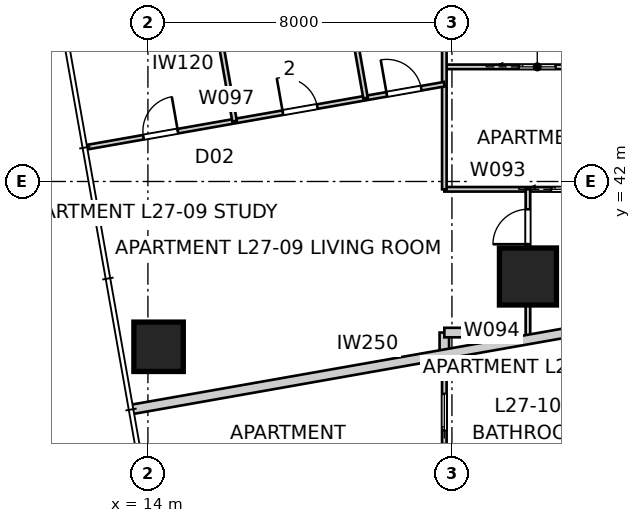
"""IFC4 building model, lengths in metres.
Left out: names, types, materials, properties, quantities, classifications, styles, units other than length and angle.
Written with IfcOpenShell. Run it as: python <this file> out.ifc"""

import sys

from ifc_helpers import new_model, si_unit, direction, frame, frame_2d, origin, origin_2d, place, context, subcontext, project, spatial, rectangle, extrude, element, fill, save


model = new_model("IFC4")
c1 = context("Model", 3, precision=1e-05, world=origin(), true_north=direction((0.0, 1.0)))
c2 = subcontext(c1, "Body", "Model", "MODEL_VIEW")
j1 = project(units=[si_unit("LENGTHUNIT", "METRE"), si_unit("PLANEANGLEUNIT", "RADIAN")], contexts=[c1])
p1 = place(None, origin())
s1 = spatial("IfcSite", under=j1, at=p1, CompositionType="ELEMENT")
p2 = place(p1, origin())
s2 = spatial("IfcBuilding", under=s1, at=p2, CompositionType="ELEMENT")
p3 = place(p2, frame((0.0, 0.0, 99.8)))
s3 = spatial("IfcBuildingStorey", under=s2, at=p3, CompositionType="ELEMENT", Elevation=99.8)
p4 = place(p3, frame((14.281, 37.65, 0.0), z_axis=(0.0, 0.0, 1.0), x_axis=(1.0, 0.0, 0.0)))
e1 = element("IfcColumn", 1, at=p4, inside=s3, PredefinedType="COLUMN", context=c2, shape_type="SweptSolid", body=[
    extrude(rectangle(XDim=1.3, YDim=1.3, at=origin_2d()), origin(), (0.0, 0.0, 1.0), 3.4),
])
p5 = place(p3, frame((24.0, 39.5, 0.0), z_axis=(0.0, 0.0, 1.0), x_axis=(1.0, 0.0, 0.0)))
e2 = element("IfcColumn", 2, at=p5, inside=s3, PredefinedType="COLUMN", context=c2, shape_type="SweptSolid", body=[
    extrude(rectangle(XDim=1.5, YDim=1.5, at=origin_2d()), origin(), (0.0, 0.0, 1.0), 3.4),
])
p6 = place(p3, frame((13.556, 35.999, 0.0), z_axis=(0.0, 0.0, 1.0), x_axis=(0.984809355703, 0.173639088111, 0.0)))
e3 = element("IfcWall", 3, at=p6, inside=s3, PredefinedType="PARTITIONING", context=c2, shape_type="SweptSolid", body=[
    extrude(rectangle(XDim=12.857, YDim=0.25, at=frame_2d((6.428, 0.0))), origin(), (0.0, 0.0, 1.0), 3.25),
])
p7 = place(p3, frame((21.8, 11.8, 0.0), z_axis=(0.0, 0.0, 1.0), x_axis=(0.0, 1.0, 0.0)))
e4 = element("IfcWall", 4, at=p7, inside=s3, PredefinedType="PARTITIONING", context=c2, shape_type="SweptSolid", body=[
    extrude(rectangle(XDim=25.653, YDim=0.12, at=frame_2d((12.826, 0.0))), origin(), (0.0, 0.0, 1.0), 3.25),
])
p8 = place(p7, frame((16.333, 0.0, 0.0)))
e5 = element("IfcOpeningElement", 5, at=p8, cuts=e4, PredefinedType="OPENING", context=c2, shape_type="SweptSolid", body=[
    extrude(rectangle(XDim=0.92, YDim=2.34, at=frame_2d((0.46, 1.17))), frame((0.0, 0.07, 0.0), z_axis=(0.0, -1.0, 0.0), x_axis=(1.0, 0.0, 0.0)), (0.0, 0.0, 1.0), 0.14),
])
p9 = place(p7, frame((18.821, 0.0, 0.0)))
e6 = element("IfcOpeningElement", 6, at=p9, cuts=e4, PredefinedType="OPENING", context=c2, shape_type="SweptSolid", body=[
    extrude(rectangle(XDim=0.92, YDim=2.34, at=frame_2d((0.46, 1.17))), frame((0.0, 0.07, 0.0), z_axis=(0.0, -1.0, 0.0), x_axis=(1.0, 0.0, 0.0)), (0.0, 0.0, 1.0), 0.14),
])
p10 = place(p7, frame((12.401, 0.0, 0.0)))
e7 = element("IfcOpeningElement", 7, at=p10, cuts=e4, PredefinedType="OPENING", context=c2, shape_type="SweptSolid", body=[
    extrude(rectangle(XDim=0.92, YDim=2.34, at=frame_2d((0.46, 1.17))), frame((0.0, 0.07, 0.0), z_axis=(0.0, -1.0, 0.0), x_axis=(1.0, 0.0, 0.0)), (0.0, 0.0, 1.0), 0.14),
])
p11 = place(p7, frame((2.066, 0.0, 0.0)))
e8 = element("IfcOpeningElement", 8, at=p11, cuts=e4, PredefinedType="OPENING", context=c2, shape_type="SweptSolid", body=[
    extrude(rectangle(XDim=0.92, YDim=2.34, at=frame_2d((0.46, 1.17))), frame((0.0, 0.07, 0.0), z_axis=(0.0, -1.0, 0.0), x_axis=(1.0, 0.0, 0.0)), (0.0, 0.0, 1.0), 0.14),
])
p12 = place(p7, frame((23.651, 0.0, 0.0)))
e9 = element("IfcOpeningElement", 9, at=p12, cuts=e4, PredefinedType="OPENING", context=c2, shape_type="SweptSolid", body=[
    extrude(rectangle(XDim=0.96, YDim=2.1, at=frame_2d((0.48, 1.05))), frame((0.0, 0.07, 0.0), z_axis=(0.0, -1.0, 0.0), x_axis=(1.0, 0.0, 0.0)), (0.0, 0.0, 1.0), 0.14),
])
p13 = place(p3, frame((21.8, 37.478, 0.0), z_axis=(0.0, 0.0, 1.0), x_axis=(0.0, 1.0, 0.0)))
e10 = element("IfcWall", 10, at=p13, inside=s3, PredefinedType="PARTITIONING", context=c2, shape_type="SweptSolid", body=[
    extrude(rectangle(XDim=0.547, YDim=0.25, at=frame_2d((0.273, 0.0))), origin(), (0.0, 0.0, 1.0), 3.25),
])
p14 = place(p3, frame((21.8, 38.025, 0.0), z_axis=(0.0, 0.0, 1.0), x_axis=(1.0, 0.0, 0.0)))
e11 = element("IfcWall", 11, at=p14, inside=s3, PredefinedType="PARTITIONING", context=c2, shape_type="SweptSolid", body=[
    extrude(rectangle(XDim=1.861, YDim=0.25, at=frame_2d((0.93, 0.0))), origin(), (0.0, 0.0, 1.0), 3.25),
])
p15 = place(p3, frame((21.8, 41.795, 0.0), z_axis=(0.0, 0.0, 1.0), x_axis=(1.0, 0.0, 0.0)))
e12 = element("IfcWall", 12, at=p15, inside=s3, PredefinedType="PARTITIONING", context=c2, shape_type="SweptSolid", body=[
    extrude(rectangle(XDim=4.4, YDim=0.12, at=frame_2d((2.2, 0.0))), origin(), (0.0, 0.0, 1.0), 3.25),
])
p16 = place(p15, frame((2.82, 0.0, 0.0)))
e13 = element("IfcOpeningElement", 13, at=p16, cuts=e12, PredefinedType="OPENING", context=c2, shape_type="SweptSolid", body=[
    extrude(rectangle(XDim=0.96, YDim=2.1, at=frame_2d((0.48, 1.05))), frame((0.0, 0.07, 0.0), z_axis=(0.0, -1.0, 0.0), x_axis=(1.0, 0.0, 0.0)), (0.0, 0.0, 1.0), 0.14),
])
p17 = place(p3, frame((24.0, 37.948, 0.0), z_axis=(0.0, 0.0, 1.0), x_axis=(0.0, 1.0, 0.0)))
e14 = element("IfcWall", 14, at=p17, inside=s3, PredefinedType="PARTITIONING", context=c2, shape_type="SweptSolid", body=[
    extrude(rectangle(XDim=3.847, YDim=0.12, at=frame_2d((1.923, 0.0))), origin(), (0.0, 0.0, 1.0), 2.55),
])
p18 = place(p17, frame((2.402, 0.0, 0.0)))
e15 = element("IfcOpeningElement", 15, at=p18, cuts=e14, PredefinedType="OPENING", context=c2, shape_type="SweptSolid", body=[
    extrude(rectangle(XDim=0.92, YDim=2.34, at=frame_2d((0.46, 1.17))), frame((0.0, 0.07, 0.0), z_axis=(0.0, -1.0, 0.0), x_axis=(1.0, 0.0, 0.0)), (0.0, 0.0, 1.0), 0.14),
])
p19 = place(p3, frame((21.8, 45.017, 0.0), z_axis=(0.0, 0.0, 1.0), x_axis=(1.0, 0.0, 0.0)))
e16 = element("IfcWall", 16, at=p19, inside=s3, PredefinedType="PARTITIONING", context=c2, shape_type="SweptSolid", body=[
    extrude(rectangle(XDim=4.89, YDim=0.12, at=frame_2d((2.445, 0.0))), origin(), (0.0, 0.0, 1.0), 3.25),
])
p20 = place(p19, frame((1.965, 0.0, 0.0)))
e17 = element("IfcOpeningElement", 17, at=p20, cuts=e16, PredefinedType="OPENING", context=c2, shape_type="SweptSolid", body=[
    extrude(rectangle(XDim=0.96, YDim=2.1, at=frame_2d((0.48, 1.05))), frame((0.0, 0.07, 0.0), z_axis=(0.0, -1.0, 0.0), x_axis=(1.0, 0.0, 0.0)), (0.0, 0.0, 1.0), 0.14),
])
p21 = place(p3, frame((21.8, 41.795, 0.0), z_axis=(0.0, 0.0, 1.0), x_axis=(0.0, 1.0, 0.0)))
e18 = element("IfcWall", 18, at=p21, inside=s3, PredefinedType="PARTITIONING", context=c2, shape_type="SweptSolid", body=[
    extrude(rectangle(XDim=6.405, YDim=0.12, at=frame_2d((3.203, 0.0))), origin(), (0.0, 0.0, 1.0), 3.25),
])
p22 = place(p3, frame((12.38, 42.9, 0.0), z_axis=(0.0, 0.0, 1.0), x_axis=(0.984808730291, 0.173642635155, 0.0)))
e19 = element("IfcWall", 19, at=p22, inside=s3, PredefinedType="PARTITIONING", context=c2, shape_type="SweptSolid", body=[
    extrude(rectangle(XDim=9.565, YDim=0.12, at=frame_2d((4.782, 0.0))), origin(), (0.0, 0.0, 1.0), 3.25),
])
p23 = place(p22, frame((1.525, 0.0, 0.0)))
e20 = element("IfcOpeningElement", 20, at=p23, cuts=e19, PredefinedType="OPENING", context=c2, shape_type="SweptSolid", body=[
    extrude(rectangle(XDim=0.92, YDim=2.34, at=frame_2d((0.46, 1.17))), frame((0.0, 0.07, 0.0), z_axis=(0.0, -1.0, 0.0), x_axis=(1.0, 0.0, 0.0)), (0.0, 0.0, 1.0), 0.14),
])
p24 = place(p22, frame((5.25, 0.0, 0.0)))
e21 = element("IfcOpeningElement", 21, at=p24, cuts=e19, PredefinedType="OPENING", context=c2, shape_type="SweptSolid", body=[
    extrude(rectangle(XDim=0.92, YDim=2.34, at=frame_2d((0.46, 1.17))), frame((0.0, 0.07, 0.0), z_axis=(0.0, -1.0, 0.0), x_axis=(1.0, 0.0, 0.0)), (0.0, 0.0, 1.0), 0.14),
])
p25 = place(p22, frame((8.028, 0.0, 0.0)))
e22 = element("IfcOpeningElement", 22, at=p25, cuts=e19, PredefinedType="OPENING", context=c2, shape_type="SweptSolid", body=[
    extrude(rectangle(XDim=0.92, YDim=2.34, at=frame_2d((0.46, 1.17))), frame((0.0, 0.07, 0.0), z_axis=(0.0, -1.0, 0.0), x_axis=(1.0, 0.0, 0.0)), (0.0, 0.0, 1.0), 0.14),
])
p26 = place(p3, frame((19.727, 44.195, 0.0), z_axis=(0.0, 0.0, 1.0), x_axis=(-0.173647177755, 0.984807929323, 0.0)))
e23 = element("IfcWall", 23, at=p26, inside=s3, PredefinedType="PARTITIONING", context=c2, shape_type="SweptSolid", body=[
    extrude(rectangle(XDim=7.46, YDim=0.12, at=frame_2d((3.73, 0.0))), origin(), (0.0, 0.0, 1.0), 3.25),
])
p27 = place(p3, frame((16.28, 43.588, 0.0), z_axis=(0.0, 0.0, 1.0), x_axis=(-0.173660541335, 0.984805572884, 0.0)))
e24 = element("IfcWall", 24, at=p27, inside=s3, PredefinedType="PARTITIONING", context=c2, shape_type="SweptSolid", body=[
    extrude(rectangle(XDim=3.46, YDim=0.12, at=frame_2d((1.73, 0.0))), origin(), (0.0, 0.0, 1.0), 3.25),
])
p28 = place(p18, origin())
e25 = element("IfcDoor", 25, at=p28, inside=s3, OperationType="SINGLE_SWING_LEFT", PredefinedType="DOOR", context=c2, shape_type="SweptSolid", body=[
    extrude(rectangle(XDim=0.92, YDim=2.34, at=frame_2d((0.46, 1.17))), frame((0.0, 0.025, 0.0), z_axis=(0.0, -1.0, 0.0), x_axis=(1.0, 0.0, 0.0)), (0.0, 0.0, 1.0), 0.05),
])
fill(e15, e25)
p29 = place(p16, origin())
e26 = element("IfcDoor", 26, at=p29, inside=s3, OperationType="SLIDING_TO_LEFT", PredefinedType="DOOR", context=c2, shape_type="SweptSolid", body=[
    extrude(rectangle(XDim=0.96, YDim=2.1, at=frame_2d((0.48, 1.05))), frame((0.0, 0.025, 0.0), z_axis=(0.0, -1.0, 0.0), x_axis=(1.0, 0.0, 0.0)), (0.0, 0.0, 1.0), 0.05),
])
fill(e13, e26)
p30 = place(p23, origin())
e27 = element("IfcDoor", 27, at=p30, inside=s3, OperationType="SINGLE_SWING_RIGHT", PredefinedType="DOOR", context=c2, shape_type="SweptSolid", body=[
    extrude(rectangle(XDim=0.92, YDim=2.34, at=frame_2d((0.46, 1.17))), frame((0.0, 0.025, 0.0), z_axis=(0.0, -1.0, 0.0), x_axis=(1.0, 0.0, 0.0)), (0.0, 0.0, 1.0), 0.05),
])
fill(e20, e27)
p31 = place(p24, origin())
e28 = element("IfcDoor", 28, at=p31, inside=s3, OperationType="SINGLE_SWING_LEFT", PredefinedType="DOOR", context=c2, shape_type="SweptSolid", body=[
    extrude(rectangle(XDim=0.92, YDim=2.34, at=frame_2d((0.46, 1.17))), frame((0.0, 0.025, 0.0), z_axis=(0.0, -1.0, 0.0), x_axis=(1.0, 0.0, 0.0)), (0.0, 0.0, 1.0), 0.05),
])
fill(e21, e28)
p32 = place(p25, origin())
e29 = element("IfcDoor", 29, at=p32, inside=s3, OperationType="SINGLE_SWING_LEFT", PredefinedType="DOOR", context=c2, shape_type="SweptSolid", body=[
    extrude(rectangle(XDim=0.92, YDim=2.34, at=frame_2d((0.46, 1.17))), frame((0.0, 0.025, 0.0), z_axis=(0.0, -1.0, 0.0), x_axis=(1.0, 0.0, 0.0)), (0.0, 0.0, 1.0), 0.05),
])
fill(e22, e29)
p33 = place(p20, origin())
e30 = element("IfcDoor", 30, at=p33, inside=s3, OperationType="SLIDING_TO_LEFT", PredefinedType="DOOR", context=c2, shape_type="SweptSolid", body=[
    extrude(rectangle(XDim=0.96, YDim=2.1, at=frame_2d((0.48, 1.05))), frame((0.0, 0.025, 0.0), z_axis=(0.0, -1.0, 0.0), x_axis=(1.0, 0.0, 0.0)), (0.0, 0.0, 1.0), 0.05),
])
fill(e17, e30)
p34 = place(p12, origin())
e31 = element("IfcDoor", 31, at=p34, inside=s3, OperationType="SLIDING_TO_LEFT", PredefinedType="DOOR", context=c2, shape_type="SweptSolid", body=[
    extrude(rectangle(XDim=0.96, YDim=2.1, at=frame_2d((0.48, 1.05))), frame((0.0, 0.025, 0.0), z_axis=(0.0, -1.0, 0.0), x_axis=(1.0, 0.0, 0.0)), (0.0, 0.0, 1.0), 0.05),
])
fill(e9, e31)
save(model, sys.argv[1])
